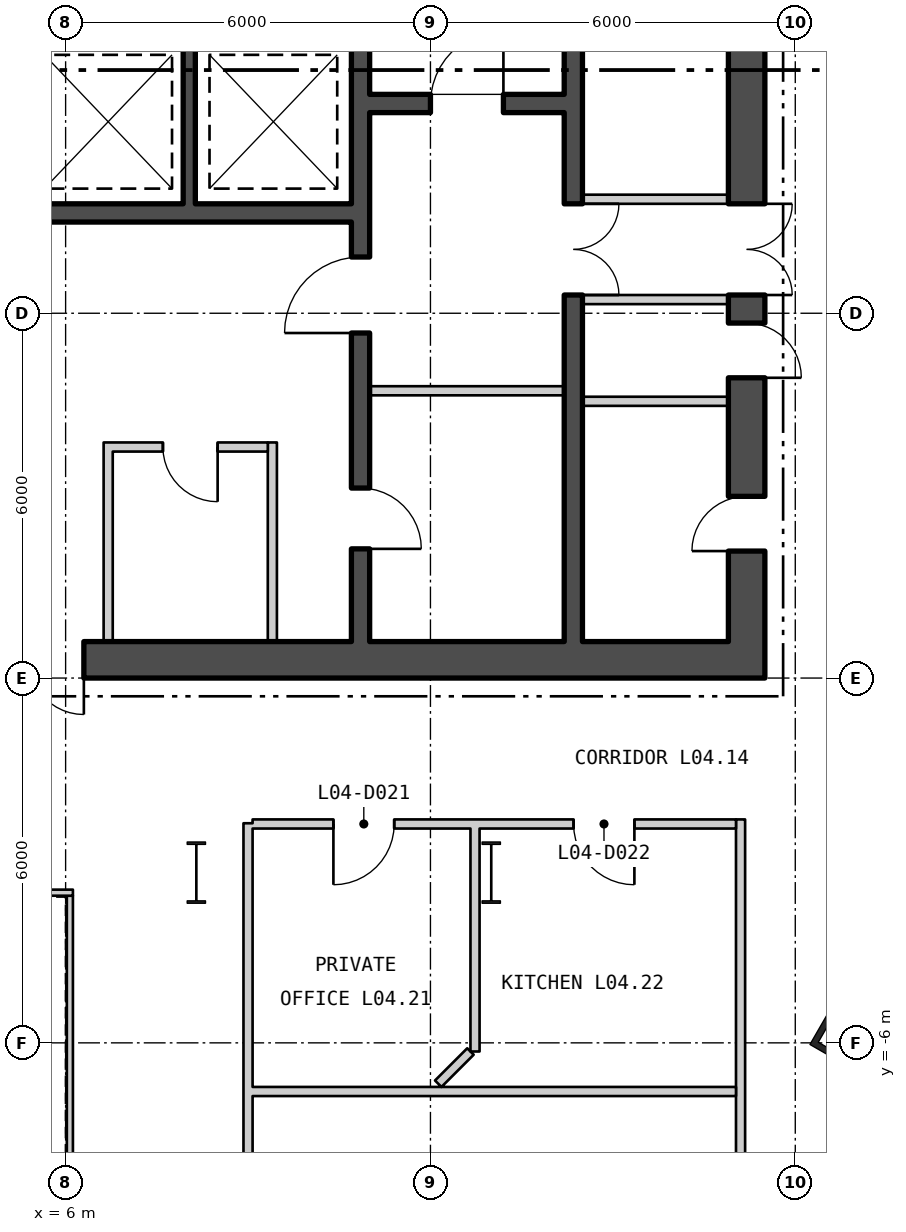
"""IFC4 building model, lengths in metres.
Left out: names, types, materials, properties, quantities, classifications, styles, units other than length and angle.
Written with IfcOpenShell. Run it as: python <this file> out.ifc"""

import sys

from ifc_helpers import new_model, si_unit, direction, frame, frame_2d, origin, origin_2d, place, context, subcontext, project, spatial, rectangle, hollow_rectangle, i_section, extrude, element, fill, save


model = new_model("IFC4")
c1 = context("Model", 3, precision=1e-05, world=origin(), true_north=direction((0.0, 1.0)))
c2 = subcontext(c1, "Body", "Model", "MODEL_VIEW")
j1 = project(units=[si_unit("LENGTHUNIT", "METRE"), si_unit("PLANEANGLEUNIT", "RADIAN")], contexts=[c1])
p1 = place(None, origin())
s1 = spatial("IfcSite", under=j1, at=p1, CompositionType="ELEMENT")
p2 = place(p1, origin())
s2 = spatial("IfcBuilding", under=s1, at=p2, CompositionType="ELEMENT")
p3 = place(p2, frame((0.0, 0.0, 23.7)))
s3 = spatial("IfcBuildingStorey", under=s2, at=p3, CompositionType="ELEMENT", Elevation=23.7)
p4 = place(p3, frame((19.061, -5.807, 0.0), z_axis=(0.0, 0.0, 1.0), x_axis=(0.5, 0.866025403784, 0.0)))
e1 = element("IfcColumn", 1, at=p4, inside=s3, PredefinedType="COLUMN", context=c2, shape_type="SweptSolid", body=[
    extrude(hollow_rectangle(XDim=1.2, YDim=1.2, WallThickness=0.1, at=origin_2d()), origin(), (0.0, 0.0, 1.0), 5.1),
])
for number, where, z_axis, x_axis in (
    (2, (8.15, -3.2, 0.0), (0.0, 0.0, 1.0), (1.0, 0.0, 0.0)),
    (3, (13.0, -3.2, 0.0), (0.0, 0.0, 1.0), (1.0, 0.0, 0.0)),
):
    element("IfcColumn", number, at=place(p3, frame(where, z_axis=z_axis, x_axis=x_axis)), inside=s3, PredefinedType="COLUMN", context=c2, shape_type="SweptSolid", body=[
        extrude(i_section(OverallWidth=0.302, OverallDepth=1.008, WebThickness=0.021, FlangeThickness=0.04, at=origin_2d()), origin(), (0.0, 0.0, 1.0), 5.1),
    ])
p5 = place(p3, frame((6.07, -11.62, 0.0), z_axis=(0.0, 0.0, 1.0), x_axis=(0.0, 1.0, 0.0)))
e4 = element("IfcWall", 4, at=p5, inside=s3, PredefinedType="PARTITIONING", context=c2, shape_type="SweptSolid", body=[
    extrude(rectangle(XDim=8.04, YDim=0.1, at=frame_2d((4.02, 0.0))), origin(), (0.0, 0.0, 1.0), 4.85),
])
p6 = place(p3, frame((6.12, -3.53, 0.0), z_axis=(0.0, 0.0, 1.0), x_axis=(-1.0, 0.0, 0.0)))
e5 = element("IfcWall", 5, at=p6, inside=s3, PredefinedType="PARTITIONING", context=c2, shape_type="SweptSolid", body=[
    extrude(rectangle(XDim=12.24, YDim=0.1, at=frame_2d((6.12, 0.0))), origin(), (0.0, 0.0, 1.0), 4.85),
])
p7 = place(p3, frame((-17.5, 0.3, 0.0), z_axis=(0.0, 0.0, 1.0), x_axis=(1.0, 0.0, 0.0)))
e6 = element("IfcWall", 6, at=p7, inside=s3, PredefinedType="SHEAR", context=c2, shape_type="SweptSolid", body=[
    extrude(rectangle(XDim=35.0, YDim=0.6, at=frame_2d((17.5, 0.0))), origin(), (0.0, 0.0, 1.0), 4.85),
])
p8 = place(p7, frame((12.0, 0.0, 0.0)))
e7 = element("IfcOpeningElement", 7, at=p8, cuts=e6, PredefinedType="OPENING", context=c2, shape_type="SweptSolid", body=[
    extrude(rectangle(XDim=1.8, YDim=2.4, at=frame_2d((0.9, 1.2))), frame((0.0, 0.31, 0.0), z_axis=(0.0, -1.0, 0.0), x_axis=(1.0, 0.0, 0.0)), (0.0, 0.0, 1.0), 0.62),
])
p9 = place(p7, frame((22.0, 0.0, 0.0)))
e8 = element("IfcOpeningElement", 8, at=p9, cuts=e6, PredefinedType="OPENING", context=c2, shape_type="SweptSolid", body=[
    extrude(rectangle(XDim=1.8, YDim=2.4, at=frame_2d((0.9, 1.2))), frame((0.0, 0.31, 0.0), z_axis=(0.0, -1.0, 0.0), x_axis=(1.0, 0.0, 0.0)), (0.0, 0.0, 1.0), 0.62),
])
p10 = place(p3, frame((17.2, 0.6, 0.0), z_axis=(0.0, 0.0, 1.0), x_axis=(0.0, 1.0, 0.0)))
e9 = element("IfcWall", 9, at=p10, inside=s3, PredefinedType="SHEAR", context=c2, shape_type="SweptSolid", body=[
    extrude(rectangle(XDim=16.8, YDim=0.6, at=frame_2d((8.4, 0.0))), origin(), (0.0, 0.0, 1.0), 4.85),
])
p11 = place(p10, frame((5.7, 0.0, 0.0)))
e10 = element("IfcOpeningElement", 10, at=p11, cuts=e9, PredefinedType="OPENING", context=c2, shape_type="SweptSolid", body=[
    extrude(rectangle(XDim=1.5, YDim=2.1, at=frame_2d((0.75, 1.05))), frame((0.0, 0.31, 0.0), z_axis=(0.0, -1.0, 0.0), x_axis=(1.0, 0.0, 0.0)), (0.0, 0.0, 1.0), 0.62),
])
p12 = place(p10, frame((1.488, 0.0, 0.0)))
e11 = element("IfcOpeningElement", 11, at=p12, cuts=e9, PredefinedType="OPENING", context=c2, shape_type="SweptSolid", body=[
    extrude(rectangle(XDim=0.9, YDim=2.1, at=frame_2d((0.45, 1.05))), frame((0.0, 0.31, 0.0), z_axis=(0.0, -1.0, 0.0), x_axis=(1.0, 0.0, 0.0)), (0.0, 0.0, 1.0), 0.62),
])
p13 = place(p10, frame((4.338, 0.0, 0.0)))
e12 = element("IfcOpeningElement", 12, at=p13, cuts=e9, PredefinedType="OPENING", context=c2, shape_type="SweptSolid", body=[
    extrude(rectangle(XDim=0.9, YDim=2.1, at=frame_2d((0.45, 1.05))), frame((0.0, 0.31, 0.0), z_axis=(0.0, -1.0, 0.0), x_axis=(1.0, 0.0, 0.0)), (0.0, 0.0, 1.0), 0.62),
])
p14 = place(p10, frame((10.483, 0.0, 0.0)))
e13 = element("IfcOpeningElement", 13, at=p14, cuts=e9, PredefinedType="OPENING", context=c2, shape_type="SweptSolid", body=[
    extrude(rectangle(XDim=0.9, YDim=2.1, at=frame_2d((0.45, 1.05))), frame((0.0, 0.31, 0.0), z_axis=(0.0, -1.0, 0.0), x_axis=(1.0, 0.0, 0.0)), (0.0, 0.0, 1.0), 0.62),
])
p15 = place(p10, frame((15.233, 0.0, 0.0)))
e14 = element("IfcOpeningElement", 14, at=p15, cuts=e9, PredefinedType="OPENING", context=c2, shape_type="SweptSolid", body=[
    extrude(rectangle(XDim=1.0, YDim=2.1, at=frame_2d((0.5, 1.05))), frame((0.0, 0.31, 0.0), z_axis=(0.0, -1.0, 0.0), x_axis=(1.0, 0.0, 0.0)), (0.0, 0.0, 1.0), 0.62),
])
p16 = place(p3, frame((10.85, 0.6, 0.0), z_axis=(0.0, 0.0, 1.0), x_axis=(0.0, 1.0, 0.0)))
e15 = element("IfcWall", 15, at=p16, inside=s3, PredefinedType="SHEAR", context=c2, shape_type="SweptSolid", body=[
    extrude(rectangle(XDim=16.8, YDim=0.3, at=frame_2d((8.4, 0.0))), origin(), (0.0, 0.0, 1.0), 4.85),
])
p17 = place(p16, frame((5.075, 0.0, 0.0)))
e16 = element("IfcOpeningElement", 16, at=p17, cuts=e15, PredefinedType="OPENING", context=c2, shape_type="SweptSolid", body=[
    extrude(rectangle(XDim=1.25, YDim=2.1, at=frame_2d((0.625, 1.05))), frame((0.0, 0.16, 0.0), z_axis=(0.0, -1.0, 0.0), x_axis=(1.0, 0.0, 0.0)), (0.0, 0.0, 1.0), 0.32),
])
p18 = place(p16, frame((1.525, 0.0, 0.0)))
e17 = element("IfcOpeningElement", 17, at=p18, cuts=e15, PredefinedType="OPENING", context=c2, shape_type="SweptSolid", body=[
    extrude(rectangle(XDim=1.0, YDim=2.1, at=frame_2d((0.5, 1.05))), frame((0.0, 0.16, 0.0), z_axis=(0.0, -1.0, 0.0), x_axis=(1.0, 0.0, 0.0)), (0.0, 0.0, 1.0), 0.32),
])
p19 = place(p3, frame((14.35, 0.6, 0.0), z_axis=(0.0, 0.0, 1.0), x_axis=(0.0, 1.0, 0.0)))
e18 = element("IfcWall", 18, at=p19, inside=s3, PredefinedType="SHEAR", context=c2, shape_type="SweptSolid", body=[
    extrude(rectangle(XDim=16.8, YDim=0.3, at=frame_2d((8.4, 0.0))), origin(), (0.0, 0.0, 1.0), 4.85),
])
p20 = place(p19, frame((5.7, 0.0, 0.0)))
e19 = element("IfcOpeningElement", 19, at=p20, cuts=e18, PredefinedType="OPENING", context=c2, shape_type="SweptSolid", body=[
    extrude(rectangle(XDim=1.5, YDim=2.1, at=frame_2d((0.75, 1.05))), frame((0.0, 0.16, 0.0), z_axis=(0.0, -1.0, 0.0), x_axis=(1.0, 0.0, 0.0)), (0.0, 0.0, 1.0), 0.32),
])
p21 = place(p3, frame((11.0, 9.45, 0.0), z_axis=(0.0, 0.0, 1.0), x_axis=(1.0, 0.0, 0.0)))
e20 = element("IfcWall", 20, at=p21, inside=s3, PredefinedType="SHEAR", context=c2, shape_type="SweptSolid", body=[
    extrude(rectangle(XDim=3.2, YDim=0.3, at=frame_2d((1.6, 0.0))), origin(), (0.0, 0.0, 1.0), 4.85),
])
p22 = place(p21, frame((1.0, 0.0, 0.0)))
e21 = element("IfcOpeningElement", 21, at=p22, cuts=e20, PredefinedType="OPENING", context=c2, shape_type="SweptSolid", body=[
    extrude(rectangle(XDim=1.2, YDim=2.1, at=frame_2d((0.6, 1.05))), frame((0.0, 0.16, 0.0), z_axis=(0.0, -1.0, 0.0), x_axis=(1.0, 0.0, 0.0)), (0.0, 0.0, 1.0), 0.32),
])
p23 = place(p3, frame((2.6, 7.65, 0.0), z_axis=(0.0, 0.0, 1.0), x_axis=(1.0, 0.0, 0.0)))
e22 = element("IfcWall", 22, at=p23, inside=s3, PredefinedType="SHEAR", context=c2, shape_type="SweptSolid", body=[
    extrude(rectangle(XDim=8.1, YDim=0.3, at=frame_2d((4.05, 0.0))), origin(), (0.0, 0.0, 1.0), 4.85),
])
p24 = place(p3, frame((8.033, 7.8, 0.0), z_axis=(0.0, 0.0, 1.0), x_axis=(0.0, 1.0, 0.0)))
e23 = element("IfcWall", 23, at=p24, inside=s3, PredefinedType="SHEAR", context=c2, shape_type="SweptSolid", body=[
    extrude(rectangle(XDim=2.7, YDim=0.2, at=frame_2d((1.35, 0.0))), origin(), (0.0, 0.0, 1.0), 4.85),
])
p25 = place(p3, frame((11.0, 4.725, 0.0), z_axis=(0.0, 0.0, 1.0), x_axis=(1.0, 0.0, 0.0)))
e24 = element("IfcWall", 24, at=p25, inside=s3, PredefinedType="PARTITIONING", context=c2, shape_type="SweptSolid", body=[
    extrude(rectangle(XDim=3.2, YDim=0.15, at=frame_2d((1.6, 0.0))), origin(), (0.0, 0.0, 1.0), 4.85),
])
for number, where, z_axis, x_axis in (
    (25, (14.5, 6.225, 0.0), (0.0, 0.0, 1.0), (1.0, 0.0, 0.0)),
    (26, (14.5, 7.875, 0.0), (0.0, 0.0, 1.0), (1.0, 0.0, 0.0)),
    (27, (14.5, 4.552, 0.0), (0.0, 0.0, 1.0), (1.0, 0.0, 0.0)),
):
    element("IfcWall", number, at=place(p3, frame(where, z_axis=z_axis, x_axis=x_axis)), inside=s3, PredefinedType="PARTITIONING", context=c2, shape_type="SweptSolid", body=[
        extrude(rectangle(XDim=2.4, YDim=0.15, at=frame_2d((1.2, 0.0))), origin(), (0.0, 0.0, 1.0), 4.85),
    ])
for number, where, z_axis, x_axis in (
    (28, (6.7, 0.6, 0.0), (0.0, 0.0, 1.0), (0.0, 1.0, 0.0)),
    (29, (9.4, 0.6, 0.0), (0.0, 0.0, 1.0), (0.0, 1.0, 0.0)),
):
    element("IfcWall", number, at=place(p3, frame(where, z_axis=z_axis, x_axis=x_axis)), inside=s3, PredefinedType="PARTITIONING", context=c2, shape_type="SweptSolid", body=[
        extrude(rectangle(XDim=3.275, YDim=0.15, at=frame_2d((1.637, 0.0))), origin(), (0.0, 0.0, 1.0), 4.85),
    ])
p26 = place(p3, frame((6.775, 3.8, 0.0), z_axis=(0.0, 0.0, 1.0), x_axis=(1.0, 0.0, 0.0)))
e30 = element("IfcWall", 30, at=p26, inside=s3, PredefinedType="PARTITIONING", context=c2, shape_type="SweptSolid", body=[
    extrude(rectangle(XDim=2.55, YDim=0.15, at=frame_2d((1.275, 0.0))), origin(), (0.0, 0.0, 1.0), 4.85),
])
p27 = place(p26, frame((0.825, 0.0, 0.0)))
e31 = element("IfcOpeningElement", 31, at=p27, cuts=e30, PredefinedType="OPENING", context=c2, shape_type="SweptSolid", body=[
    extrude(rectangle(XDim=0.9, YDim=2.1, at=frame_2d((0.45, 1.05))), frame((0.0, 0.085, 0.0), z_axis=(0.0, -1.0, 0.0), x_axis=(1.0, 0.0, 0.0)), (0.0, 0.0, 1.0), 0.17),
])
p28 = place(p3, frame((9.0, -13.675, 0.0), z_axis=(0.0, 0.0, 1.0), x_axis=(0.0, 1.0, 0.0)))
e32 = element("IfcWall", 32, at=p28, inside=s3, PredefinedType="PARTITIONING", context=c2, shape_type="SweptSolid", body=[
    extrude(rectangle(XDim=11.287, YDim=0.15, at=frame_2d((5.644, 0.0))), origin(), (0.0, 0.0, 1.0), 4.85),
])
p29 = place(p28, frame((2.498, 0.0, 0.0)))
e33 = element("IfcOpeningElement", 33, at=p29, cuts=e32, PredefinedType="OPENING", context=c2, shape_type="SweptSolid", body=[
    extrude(rectangle(XDim=1.8, YDim=2.1, at=frame_2d((0.9, 1.05))), frame((0.0, 0.085, 0.0), z_axis=(0.0, -1.0, 0.0), x_axis=(1.0, 0.0, 0.0)), (0.0, 0.0, 1.0), 0.17),
])
p30 = place(p3, frame((9.075, -6.8, 0.0), z_axis=(0.0, 0.0, 1.0), x_axis=(1.0, 0.0, 0.0)))
e34 = element("IfcWall", 34, at=p30, inside=s3, PredefinedType="PARTITIONING", context=c2, shape_type="SweptSolid", body=[
    extrude(rectangle(XDim=7.95, YDim=0.15, at=frame_2d((3.975, 0.0))), origin(), (0.0, 0.0, 1.0), 4.85),
])
p31 = place(p3, frame((9.075, -2.4, 0.0), z_axis=(0.0, 0.0, 1.0), x_axis=(1.0, 0.0, 0.0)))
e35 = element("IfcWall", 35, at=p31, inside=s3, PredefinedType="PARTITIONING", context=c2, shape_type="SweptSolid", body=[
    extrude(rectangle(XDim=7.95, YDim=0.15, at=frame_2d((3.975, 0.0))), origin(), (0.0, 0.0, 1.0), 4.85),
])
p32 = place(p31, frame((1.329, 0.0, 0.0)))
e36 = element("IfcOpeningElement", 36, at=p32, cuts=e35, PredefinedType="OPENING", context=c2, shape_type="SweptSolid", body=[
    extrude(rectangle(XDim=1.0, YDim=2.1, at=frame_2d((0.5, 1.05))), frame((0.0, 0.085, 0.0), z_axis=(0.0, -1.0, 0.0), x_axis=(1.0, 0.0, 0.0)), (0.0, 0.0, 1.0), 0.17),
])
p33 = place(p31, frame((5.279, 0.0, 0.0)))
e37 = element("IfcOpeningElement", 37, at=p33, cuts=e35, PredefinedType="OPENING", context=c2, shape_type="SweptSolid", body=[
    extrude(rectangle(XDim=1.0, YDim=2.1, at=frame_2d((0.5, 1.05))), frame((0.0, 0.085, 0.0), z_axis=(0.0, -1.0, 0.0), x_axis=(1.0, 0.0, 0.0)), (0.0, 0.0, 1.0), 0.17),
])
p34 = place(p3, frame((12.128, -6.672, 0.0), z_axis=(0.0, 0.0, 1.0), x_axis=(0.707106781187, 0.707106781187, 0.0)))
e38 = element("IfcWall", 38, at=p34, inside=s3, PredefinedType="PARTITIONING", context=c2, shape_type="SweptSolid", body=[
    extrude(rectangle(XDim=0.75, YDim=0.15, at=frame_2d((0.375, 0.0))), origin(), (0.0, 0.0, 1.0), 4.85),
])
p35 = place(p3, frame((12.733, -6.142, 0.0), z_axis=(0.0, 0.0, 1.0), x_axis=(0.0, 1.0, 0.0)))
e39 = element("IfcWall", 39, at=p35, inside=s3, PredefinedType="PARTITIONING", context=c2, shape_type="SweptSolid", body=[
    extrude(rectangle(XDim=3.042, YDim=0.15, at=frame_2d((1.521, 0.0))), origin(), (0.0, 0.0, 1.0), 4.16),
])
p36 = place(p3, frame((12.733, -3.1, 0.0), z_axis=(0.0, 0.0, 1.0), x_axis=(0.0, 1.0, 0.0)))
e40 = element("IfcWall", 40, at=p36, inside=s3, PredefinedType="PARTITIONING", context=c2, shape_type="SweptSolid", body=[
    extrude(rectangle(XDim=0.625, YDim=0.15, at=frame_2d((0.312, 0.0))), origin(), (0.0, 0.0, 1.0), 4.25),
])
p37 = place(p3, frame((17.1, -21.375, 0.0), z_axis=(0.0, 0.0, 1.0), x_axis=(0.0, 1.0, 0.0)))
e41 = element("IfcWall", 41, at=p37, inside=s3, PredefinedType="PARTITIONING", context=c2, shape_type="SweptSolid", body=[
    extrude(rectangle(XDim=19.05, YDim=0.15, at=frame_2d((9.525, 0.0))), origin(), (0.0, 0.0, 1.0), 4.85),
])
p38 = place(p37, frame((4.963, 0.0, 0.0)))
e42 = element("IfcOpeningElement", 42, at=p38, cuts=e41, PredefinedType="OPENING", context=c2, shape_type="SweptSolid", body=[
    extrude(rectangle(XDim=1.0, YDim=2.1, at=frame_2d((0.5, 1.05))), frame((0.0, 0.085, 0.0), z_axis=(0.0, -1.0, 0.0), x_axis=(1.0, 0.0, 0.0)), (0.0, 0.0, 1.0), 0.17),
])
p39 = place(p22, origin())
e43 = element("IfcDoor", 43, at=p39, inside=s3, OperationType="SINGLE_SWING_LEFT", PredefinedType="DOOR", context=c2, shape_type="SweptSolid", body=[
    extrude(rectangle(XDim=1.2, YDim=2.1, at=frame_2d((0.6, 1.05))), frame((0.0, 0.025, 0.0), z_axis=(0.0, -1.0, 0.0), x_axis=(1.0, 0.0, 0.0)), (0.0, 0.0, 1.0), 0.05),
])
fill(e21, e43)
p40 = place(p17, origin())
e44 = element("IfcDoor", 44, at=p40, inside=s3, OperationType="SINGLE_SWING_RIGHT", PredefinedType="DOOR", context=c2, shape_type="SweptSolid", body=[
    extrude(rectangle(XDim=1.25, YDim=2.1, at=frame_2d((0.625, 1.05))), frame((0.0, 0.025, 0.0), z_axis=(0.0, -1.0, 0.0), x_axis=(1.0, 0.0, 0.0)), (0.0, 0.0, 1.0), 0.05),
])
fill(e16, e44)
p41 = place(p18, origin())
e45 = element("IfcDoor", 45, at=p41, inside=s3, OperationType="SINGLE_SWING_LEFT", PredefinedType="DOOR", context=c2, shape_type="SweptSolid", body=[
    extrude(rectangle(XDim=1.0, YDim=2.1, at=frame_2d((0.5, 1.05))), frame((0.0, 0.025, 0.0), z_axis=(0.0, -1.0, 0.0), x_axis=(1.0, 0.0, 0.0)), (0.0, 0.0, 1.0), 0.05),
])
fill(e17, e45)
p42 = place(p20, origin())
e46 = element("IfcDoor", 46, at=p42, inside=s3, OperationType="DOUBLE_DOOR_SINGLE_SWING", PredefinedType="DOOR", context=c2, shape_type="SweptSolid", body=[
    extrude(rectangle(XDim=1.5, YDim=2.1, at=frame_2d((0.75, 1.05))), frame((0.0, 0.025, 0.0), z_axis=(0.0, -1.0, 0.0), x_axis=(1.0, 0.0, 0.0)), (0.0, 0.0, 1.0), 0.05),
])
fill(e19, e46)
p43 = place(p11, origin())
e47 = element("IfcDoor", 47, at=p43, inside=s3, OperationType="DOUBLE_DOOR_SINGLE_SWING", PredefinedType="DOOR", context=c2, shape_type="SweptSolid", body=[
    extrude(rectangle(XDim=1.5, YDim=2.1, at=frame_2d((0.75, 1.05))), frame((0.0, 0.025, 0.0), z_axis=(0.0, -1.0, 0.0), x_axis=(1.0, 0.0, 0.0)), (0.0, 0.0, 1.0), 0.05),
])
fill(e10, e47)
p44 = place(p12, origin())
e48 = element("IfcDoor", 48, at=p44, inside=s3, OperationType="SINGLE_SWING_RIGHT", PredefinedType="DOOR", context=c2, shape_type="SweptSolid", body=[
    extrude(rectangle(XDim=0.9, YDim=2.1, at=frame_2d((0.45, 1.05))), frame((0.0, 0.025, 0.0), z_axis=(0.0, -1.0, 0.0), x_axis=(1.0, 0.0, 0.0)), (0.0, 0.0, 1.0), 0.05),
])
fill(e11, e48)
p45 = place(p13, origin())
e49 = element("IfcDoor", 49, at=p45, inside=s3, OperationType="SINGLE_SWING_LEFT", PredefinedType="DOOR", context=c2, shape_type="SweptSolid", body=[
    extrude(rectangle(XDim=0.9, YDim=2.1, at=frame_2d((0.45, 1.05))), frame((0.0, 0.025, 0.0), z_axis=(0.0, -1.0, 0.0), x_axis=(1.0, 0.0, 0.0)), (0.0, 0.0, 1.0), 0.05),
])
fill(e12, e49)
p46 = place(p27, origin())
e50 = element("IfcDoor", 50, at=p46, inside=s3, OperationType="SINGLE_SWING_RIGHT", PredefinedType="DOOR", context=c2, shape_type="SweptSolid", body=[
    extrude(rectangle(XDim=0.9, YDim=2.1, at=frame_2d((0.45, 1.05))), frame((0.0, 0.025, 0.0), z_axis=(0.0, -1.0, 0.0), x_axis=(1.0, 0.0, 0.0)), (0.0, 0.0, 1.0), 0.05),
])
fill(e31, e50)
p47 = place(p9, origin())
e51 = element("IfcDoor", 51, at=p47, inside=s3, OperationType="DOUBLE_DOOR_SINGLE_SWING", PredefinedType="DOOR", context=c2, shape_type="SweptSolid", body=[
    extrude(rectangle(XDim=1.8, YDim=2.4, at=frame_2d((0.9, 1.2))), frame((0.0, 0.025, 0.0), z_axis=(0.0, -1.0, 0.0), x_axis=(1.0, 0.0, 0.0)), (0.0, 0.0, 1.0), 0.05),
])
fill(e8, e51)
p48 = place(p32, origin())
e52 = element("IfcDoor", 52, at=p48, inside=s3, OperationType="SINGLE_SWING_LEFT", PredefinedType="DOOR", context=c2, shape_type="SweptSolid", body=[
    extrude(rectangle(XDim=1.0, YDim=2.1, at=frame_2d((0.5, 1.05))), frame((0.0, 0.025, 0.0), z_axis=(0.0, -1.0, 0.0), x_axis=(1.0, 0.0, 0.0)), (0.0, 0.0, 1.0), 0.05),
])
fill(e36, e52)
p49 = place(p33, origin())
e53 = element("IfcDoor", 53, at=p49, inside=s3, OperationType="SINGLE_SWING_RIGHT", PredefinedType="DOOR", context=c2, shape_type="SweptSolid", body=[
    extrude(rectangle(XDim=1.0, YDim=2.1, at=frame_2d((0.5, 1.05))), frame((0.0, 0.025, 0.0), z_axis=(0.0, -1.0, 0.0), x_axis=(1.0, 0.0, 0.0)), (0.0, 0.0, 1.0), 0.05),
])
fill(e37, e53)
save(model, sys.argv[1])
